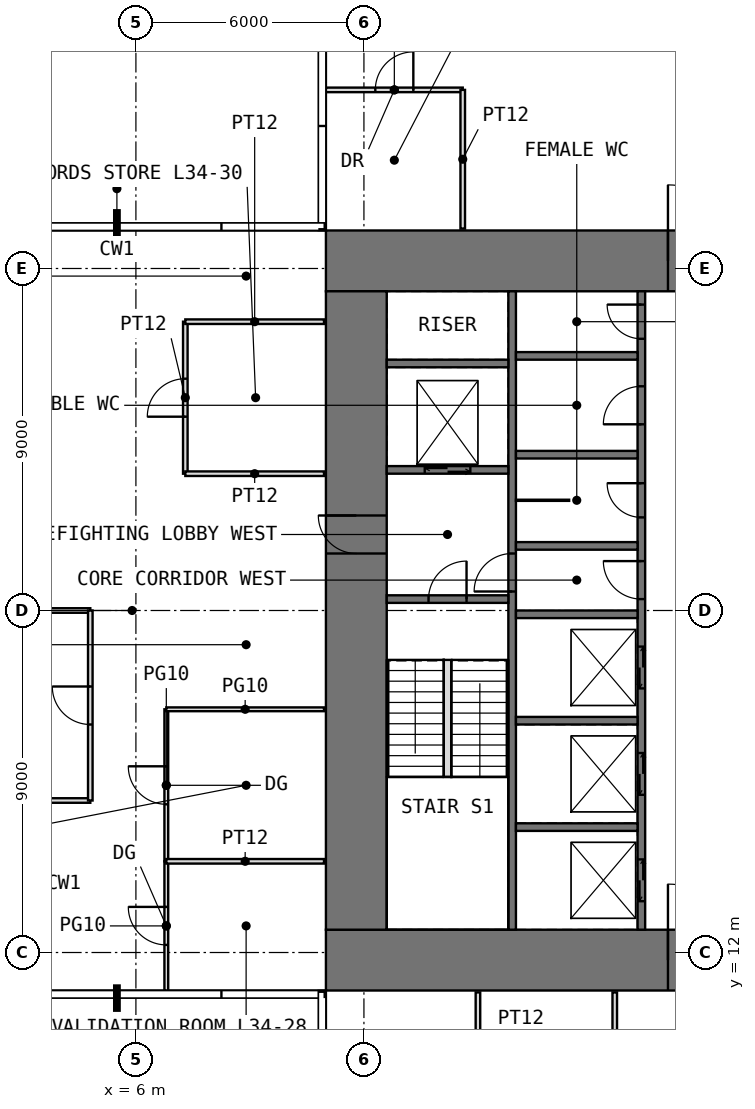
"""IFC4 building model, lengths in metres.
Left out: names, types, materials, properties, quantities, classifications, styles, units other than length and angle.
Written with IfcOpenShell. Run it as: python <this file> out.ifc"""

import sys

from ifc_helpers import new_model, si_unit, direction, frame, frame_2d, origin, place, context, subcontext, project, spatial, rectangle, extrude, element, fill, save


model = new_model("IFC4")
c1 = context("Model", 3, precision=1e-05, world=origin(), true_north=direction((0.0, 1.0)))
c2 = subcontext(c1, "Body", "Model", "MODEL_VIEW")
j1 = project(units=[si_unit("LENGTHUNIT", "METRE"), si_unit("PLANEANGLEUNIT", "RADIAN")], contexts=[c1])
p1 = place(None, origin())
s1 = spatial("IfcSite", under=j1, at=p1, CompositionType="ELEMENT")
p2 = place(p1, origin())
s2 = spatial("IfcBuilding", under=s1, at=p2, CompositionType="ELEMENT")
p3 = place(p2, frame((0.0, 0.0, 144.5)))
s3 = spatial("IfcBuildingStorey", under=s2, at=p3, CompositionType="ELEMENT", Elevation=144.5)
p4 = place(p3, frame((11.0, 11.8, -0.05), z_axis=(0.0, 0.0, 1.0), x_axis=(1.0, 0.0, 0.0)))
e1 = element("IfcWall", 1, at=p4, inside=s3, PredefinedType="SHEAR", context=c2, shape_type="SweptSolid", body=[
    extrude(rectangle(XDim=20.0, YDim=1.6, at=frame_2d((10.0, 0.0))), origin(), (0.0, 0.0, 1.0), 4.0),
])
p5 = place(p4, frame((9.0, 0.0, 0.05)))
e2 = element("IfcOpeningElement", 2, at=p5, cuts=e1, PredefinedType="OPENING", context=c2, shape_type="SweptSolid", body=[
    extrude(rectangle(XDim=2.0, YDim=2.2, at=frame_2d((1.0, 1.1))), frame((0.0, 0.81, 0.0), z_axis=(0.0, -1.0, 0.0), x_axis=(1.0, 0.0, 0.0)), (0.0, 0.0, 1.0), 1.62),
])
p6 = place(p3, frame((11.0, 30.2, -0.05), z_axis=(0.0, 0.0, 1.0), x_axis=(1.0, 0.0, 0.0)))
e3 = element("IfcWall", 3, at=p6, inside=s3, PredefinedType="SHEAR", context=c2, shape_type="SweptSolid", body=[
    extrude(rectangle(XDim=20.0, YDim=1.6, at=frame_2d((10.0, 0.0))), origin(), (0.0, 0.0, 1.0), 4.0),
])
p7 = place(p6, frame((9.0, 0.0, 0.05)))
e4 = element("IfcOpeningElement", 4, at=p7, cuts=e3, PredefinedType="OPENING", context=c2, shape_type="SweptSolid", body=[
    extrude(rectangle(XDim=2.0, YDim=2.2, at=frame_2d((1.0, 1.1))), frame((0.0, 0.81, 0.0), z_axis=(0.0, -1.0, 0.0), x_axis=(1.0, 0.0, 0.0)), (0.0, 0.0, 1.0), 1.62),
])
p8 = place(p3, frame((11.8, 12.6, -0.05), z_axis=(0.0, 0.0, 1.0), x_axis=(0.0, 1.0, 0.0)))
e5 = element("IfcWall", 5, at=p8, inside=s3, PredefinedType="SHEAR", context=c2, shape_type="SweptSolid", body=[
    extrude(rectangle(XDim=16.8, YDim=1.6, at=frame_2d((8.4, 0.0))), origin(), (0.0, 0.0, 1.0), 4.0),
])
p9 = place(p8, frame((9.9, 0.0, 0.05)))
e6 = element("IfcOpeningElement", 6, at=p9, cuts=e5, PredefinedType="OPENING", context=c2, shape_type="SweptSolid", body=[
    extrude(rectangle(XDim=1.0, YDim=2.2, at=frame_2d((0.5, 1.1))), frame((0.0, 0.81, 0.0), z_axis=(0.0, -1.0, 0.0), x_axis=(1.0, 0.0, 0.0)), (0.0, 0.0, 1.0), 1.62),
])
p10 = place(p3, frame((15.9, 12.6, -0.05), z_axis=(0.0, 0.0, 1.0), x_axis=(0.0, 1.0, 0.0)))
e7 = element("IfcWall", 7, at=p10, inside=s3, PredefinedType="SHEAR", context=c2, shape_type="SweptSolid", body=[
    extrude(rectangle(XDim=16.8, YDim=0.2, at=frame_2d((8.4, 0.0))), origin(), (0.0, 0.0, 1.0), 4.0),
])
p11 = place(p10, frame((8.9, 0.0, 0.05)))
e8 = element("IfcOpeningElement", 8, at=p11, cuts=e7, PredefinedType="OPENING", context=c2, shape_type="SweptSolid", body=[
    extrude(rectangle(XDim=1.0, YDim=2.2, at=frame_2d((0.5, 1.1))), frame((0.0, 0.11, 0.0), z_axis=(0.0, -1.0, 0.0), x_axis=(1.0, 0.0, 0.0)), (0.0, 0.0, 1.0), 0.22),
])
p12 = place(p3, frame((19.3, 12.6, -0.05), z_axis=(0.0, 0.0, 1.0), x_axis=(0.0, 1.0, 0.0)))
e9 = element("IfcWall", 9, at=p12, inside=s3, PredefinedType="SHEAR", context=c2, shape_type="SweptSolid", body=[
    extrude(rectangle(XDim=16.8, YDim=0.2, at=frame_2d((8.4, 0.0))), origin(), (0.0, 0.0, 1.0), 4.0),
])
p13 = place(p12, frame((8.7, 0.0, 0.05)))
e10 = element("IfcOpeningElement", 10, at=p13, cuts=e9, PredefinedType="OPENING", context=c2, shape_type="SweptSolid", body=[
    extrude(rectangle(XDim=1.0, YDim=2.2, at=frame_2d((0.5, 1.1))), frame((0.0, 0.11, 0.0), z_axis=(0.0, -1.0, 0.0), x_axis=(1.0, 0.0, 0.0)), (0.0, 0.0, 1.0), 0.22),
])
p14 = place(p12, frame((10.85, 0.0, 0.05)))
e11 = element("IfcOpeningElement", 11, at=p14, cuts=e9, PredefinedType="OPENING", context=c2, shape_type="SweptSolid", body=[
    extrude(rectangle(XDim=0.9, YDim=2.2, at=frame_2d((0.45, 1.1))), frame((0.0, 0.11, 0.0), z_axis=(0.0, -1.0, 0.0), x_axis=(1.0, 0.0, 0.0)), (0.0, 0.0, 1.0), 0.22),
])
p15 = place(p12, frame((13.3, 0.0, 0.05)))
e12 = element("IfcOpeningElement", 12, at=p15, cuts=e9, PredefinedType="OPENING", context=c2, shape_type="SweptSolid", body=[
    extrude(rectangle(XDim=1.0, YDim=2.2, at=frame_2d((0.5, 1.1))), frame((0.0, 0.11, 0.0), z_axis=(0.0, -1.0, 0.0), x_axis=(1.0, 0.0, 0.0)), (0.0, 0.0, 1.0), 0.22),
])
p16 = place(p12, frame((15.55, 0.0, 0.05)))
e13 = element("IfcOpeningElement", 13, at=p16, cuts=e9, PredefinedType="OPENING", context=c2, shape_type="SweptSolid", body=[
    extrude(rectangle(XDim=0.9, YDim=2.2, at=frame_2d((0.45, 1.1))), frame((0.0, 0.11, 0.0), z_axis=(0.0, -1.0, 0.0), x_axis=(1.0, 0.0, 0.0)), (0.0, 0.0, 1.0), 0.22),
])
p17 = place(p12, frame((0.75, 0.0, 0.05)))
e14 = element("IfcOpeningElement", 14, at=p17, cuts=e9, PredefinedType="OPENING", context=c2, shape_type="SweptSolid", body=[
    extrude(rectangle(XDim=1.1, YDim=2.2, at=frame_2d((0.55, 1.1))), frame((0.0, 0.11, 0.0), z_axis=(0.0, -1.0, 0.0), x_axis=(1.0, 0.0, 0.0)), (0.0, 0.0, 1.0), 0.22),
])
p18 = place(p12, frame((3.55, 0.0, 0.05)))
e15 = element("IfcOpeningElement", 15, at=p18, cuts=e9, PredefinedType="OPENING", context=c2, shape_type="SweptSolid", body=[
    extrude(rectangle(XDim=1.1, YDim=2.2, at=frame_2d((0.55, 1.1))), frame((0.0, 0.11, 0.0), z_axis=(0.0, -1.0, 0.0), x_axis=(1.0, 0.0, 0.0)), (0.0, 0.0, 1.0), 0.22),
])
p19 = place(p12, frame((6.35, 0.0, 0.05)))
e16 = element("IfcOpeningElement", 16, at=p19, cuts=e9, PredefinedType="OPENING", context=c2, shape_type="SweptSolid", body=[
    extrude(rectangle(XDim=1.1, YDim=2.2, at=frame_2d((0.55, 1.1))), frame((0.0, 0.11, 0.0), z_axis=(0.0, -1.0, 0.0), x_axis=(1.0, 0.0, 0.0)), (0.0, 0.0, 1.0), 0.22),
])
p20 = place(p3, frame((12.6, 21.3, -0.05), z_axis=(0.0, 0.0, 1.0), x_axis=(1.0, 0.0, 0.0)))
e17 = element("IfcWall", 17, at=p20, inside=s3, PredefinedType="SHEAR", context=c2, shape_type="SweptSolid", body=[
    extrude(rectangle(XDim=3.2, YDim=0.2, at=frame_2d((1.6, 0.0))), origin(), (0.0, 0.0, 1.0), 4.0),
])
p21 = place(p20, frame((1.1, 0.0, 0.05)))
e18 = element("IfcOpeningElement", 18, at=p21, cuts=e17, PredefinedType="OPENING", context=c2, shape_type="SweptSolid", body=[
    extrude(rectangle(XDim=1.0, YDim=2.2, at=frame_2d((0.5, 1.1))), frame((0.0, 0.11, 0.0), z_axis=(0.0, -1.0, 0.0), x_axis=(1.0, 0.0, 0.0)), (0.0, 0.0, 1.0), 0.22),
])
p22 = place(p3, frame((12.6, 24.7, -0.05), z_axis=(0.0, 0.0, 1.0), x_axis=(1.0, 0.0, 0.0)))
e19 = element("IfcWall", 19, at=p22, inside=s3, PredefinedType="SHEAR", context=c2, shape_type="SweptSolid", body=[
    extrude(rectangle(XDim=3.2, YDim=0.2, at=frame_2d((1.6, 0.0))), origin(), (0.0, 0.0, 1.0), 4.0),
])
p23 = place(p22, frame((1.0, 0.0, 0.05)))
e20 = element("IfcOpeningElement", 20, at=p23, cuts=e19, PredefinedType="OPENING", context=c2, shape_type="SweptSolid", body=[
    extrude(rectangle(XDim=1.2, YDim=2.2, at=frame_2d((0.6, 1.1))), frame((0.0, 0.11, 0.0), z_axis=(0.0, -1.0, 0.0), x_axis=(1.0, 0.0, 0.0)), (0.0, 0.0, 1.0), 0.22),
])
for number, where, z_axis, x_axis in (
    (21, (12.6, 27.5, -0.05), (0.0, 0.0, 1.0), (1.0, 0.0, 0.0)),
    (22, (16.0, 15.3, -0.05), (0.0, 0.0, 1.0), (1.0, 0.0, 0.0)),
    (23, (16.0, 18.1, -0.05), (0.0, 0.0, 1.0), (1.0, 0.0, 0.0)),
    (24, (16.0, 20.9, -0.05), (0.0, 0.0, 1.0), (1.0, 0.0, 0.0)),
    (25, (16.0, 22.7, -0.05), (0.0, 0.0, 1.0), (1.0, 0.0, 0.0)),
    (26, (16.0, 25.1, -0.05), (0.0, 0.0, 1.0), (1.0, 0.0, 0.0)),
    (27, (16.0, 27.7, -0.05), (0.0, 0.0, 1.0), (1.0, 0.0, 0.0)),
):
    element("IfcWall", number, at=place(p3, frame(where, z_axis=z_axis, x_axis=x_axis)), inside=s3, PredefinedType="SHEAR", context=c2, shape_type="SweptSolid", body=[
        extrude(rectangle(XDim=3.2, YDim=0.2, at=frame_2d((1.6, 0.0))), origin(), (0.0, 0.0, 1.0), 4.0),
    ])
p24 = place(p3, frame((16.0, 23.9, 0.0), z_axis=(0.0, 0.0, 1.0), x_axis=(1.0, 0.0, 0.0)))
e28 = element("IfcWall", 28, at=p24, inside=s3, PredefinedType="PARTITIONING", context=c2, shape_type="SweptSolid", body=[
    extrude(rectangle(XDim=1.4, YDim=0.03, at=frame_2d((0.7, 0.0))), origin(), (0.0, 0.0, 1.0), 3.75),
])
p25 = place(p3, frame((1.26, 16.0, 0.0), z_axis=(0.0, 0.0, 1.0), x_axis=(1.0, 0.0, 0.0)))
e29 = element("IfcWall", 29, at=p25, inside=s3, PredefinedType="PARTITIONING", context=c2, shape_type="SweptSolid", body=[
    extrude(rectangle(XDim=3.54, YDim=0.12, at=frame_2d((1.77, 0.0))), origin(), (0.0, 0.0, 1.0), 3.75),
])
p26 = place(p3, frame((3.26, 21.0, 0.0), z_axis=(0.0, 0.0, 1.0), x_axis=(1.0, 0.0, 0.0)))
e30 = element("IfcWall", 30, at=p26, inside=s3, PredefinedType="PARTITIONING", context=c2, shape_type="SweptSolid", body=[
    extrude(rectangle(XDim=1.54, YDim=0.12, at=frame_2d((0.77, 0.0))), origin(), (0.0, 0.0, 1.0), 3.75),
])
p27 = place(p3, frame((4.8, 16.0, 0.0), z_axis=(0.0, 0.0, 1.0), x_axis=(0.0, 1.0, 0.0)))
e31 = element("IfcWall", 31, at=p27, inside=s3, PredefinedType="PARTITIONING", context=c2, shape_type="SweptSolid", body=[
    extrude(rectangle(XDim=5.0, YDim=0.12, at=frame_2d((2.5, 0.0))), origin(), (0.0, 0.0, 1.0), 3.75),
])
p28 = place(p27, frame((2.0, 0.0, 0.0)))
e32 = element("IfcOpeningElement", 32, at=p28, cuts=e31, PredefinedType="OPENING", context=c2, shape_type="SweptSolid", body=[
    extrude(rectangle(XDim=1.0, YDim=2.2, at=frame_2d((0.5, 1.1))), frame((0.0, 0.07, 0.0), z_axis=(0.0, -1.0, 0.0), x_axis=(1.0, 0.0, 0.0)), (0.0, 0.0, 1.0), 0.14),
])
p29 = place(p3, frame((6.8, 11.0, 0.0), z_axis=(0.0, 0.0, 1.0), x_axis=(0.0, 1.0, 0.0)))
e33 = element("IfcWall", 33, at=p29, inside=s3, PredefinedType="PARTITIONING", context=c2, shape_type="SweptSolid", body=[
    extrude(rectangle(XDim=3.4, YDim=0.1, at=frame_2d((1.7, 0.0))), origin(), (0.0, 0.0, 1.0), 3.75),
])
p30 = place(p29, frame((1.2, 0.0, 0.0)))
e34 = element("IfcOpeningElement", 34, at=p30, cuts=e33, PredefinedType="OPENING", context=c2, shape_type="SweptSolid", body=[
    extrude(rectangle(XDim=1.0, YDim=2.4, at=frame_2d((0.5, 1.2))), frame((0.0, 0.06, 0.0), z_axis=(0.0, -1.0, 0.0), x_axis=(1.0, 0.0, 0.0)), (0.0, 0.0, 1.0), 0.12),
])
p31 = place(p3, frame((6.8, 14.4, 0.0), z_axis=(0.0, 0.0, 1.0), x_axis=(0.0, 1.0, 0.0)))
e35 = element("IfcWall", 35, at=p31, inside=s3, PredefinedType="PARTITIONING", context=c2, shape_type="SweptSolid", body=[
    extrude(rectangle(XDim=4.0, YDim=0.1, at=frame_2d((2.0, 0.0))), origin(), (0.0, 0.0, 1.0), 3.75),
])
p32 = place(p31, frame((1.5, 0.0, 0.0)))
e36 = element("IfcOpeningElement", 36, at=p32, cuts=e35, PredefinedType="OPENING", context=c2, shape_type="SweptSolid", body=[
    extrude(rectangle(XDim=1.0, YDim=2.4, at=frame_2d((0.5, 1.2))), frame((0.0, 0.06, 0.0), z_axis=(0.0, -1.0, 0.0), x_axis=(1.0, 0.0, 0.0)), (0.0, 0.0, 1.0), 0.12),
])
p33 = place(p3, frame((6.8, 14.4, 0.0), z_axis=(0.0, 0.0, 1.0), x_axis=(1.0, 0.0, 0.0)))
e37 = element("IfcWall", 37, at=p33, inside=s3, PredefinedType="PARTITIONING", context=c2, shape_type="SweptSolid", body=[
    extrude(rectangle(XDim=4.15, YDim=0.12, at=frame_2d((2.075, 0.0))), origin(), (0.0, 0.0, 1.0), 3.75),
])
p34 = place(p3, frame((6.8, 18.4, 0.0), z_axis=(0.0, 0.0, 1.0), x_axis=(1.0, 0.0, 0.0)))
e38 = element("IfcWall", 38, at=p34, inside=s3, PredefinedType="PARTITIONING", context=c2, shape_type="SweptSolid", body=[
    extrude(rectangle(XDim=4.15, YDim=0.1, at=frame_2d((2.075, 0.0))), origin(), (0.0, 0.0, 1.0), 3.75),
])
p35 = place(p3, frame((7.3, 24.6, 0.0), z_axis=(0.0, 0.0, 1.0), x_axis=(0.0, 1.0, 0.0)))
e39 = element("IfcWall", 39, at=p35, inside=s3, PredefinedType="PARTITIONING", context=c2, shape_type="SweptSolid", body=[
    extrude(rectangle(XDim=4.0, YDim=0.12, at=frame_2d((2.0, 0.0))), origin(), (0.0, 0.0, 1.0), 3.75),
])
p36 = place(p35, frame((1.5, 0.0, 0.0)))
e40 = element("IfcOpeningElement", 40, at=p36, cuts=e39, PredefinedType="OPENING", context=c2, shape_type="SweptSolid", body=[
    extrude(rectangle(XDim=1.0, YDim=2.2, at=frame_2d((0.5, 1.1))), frame((0.0, 0.07, 0.0), z_axis=(0.0, -1.0, 0.0), x_axis=(1.0, 0.0, 0.0)), (0.0, 0.0, 1.0), 0.14),
])
for number, where, z_axis, x_axis in (
    (41, (7.3, 24.6, 0.0), (0.0, 0.0, 1.0), (1.0, 0.0, 0.0)),
    (42, (7.3, 28.6, 0.0), (0.0, 0.0, 1.0), (1.0, 0.0, 0.0)),
):
    element("IfcWall", number, at=place(p3, frame(where, z_axis=z_axis, x_axis=x_axis)), inside=s3, PredefinedType="PARTITIONING", context=c2, shape_type="SweptSolid", body=[
        extrude(rectangle(XDim=3.65, YDim=0.12, at=frame_2d((1.825, 0.0))), origin(), (0.0, 0.0, 1.0), 3.75),
    ])
p37 = place(p3, frame((11.0, 34.7, 0.0), z_axis=(0.0, 0.0, 1.0), x_axis=(1.0, 0.0, 0.0)))
e43 = element("IfcWall", 43, at=p37, inside=s3, PredefinedType="PARTITIONING", context=c2, shape_type="SweptSolid", body=[
    extrude(rectangle(XDim=3.6, YDim=0.12, at=frame_2d((1.8, 0.0))), origin(), (0.0, 0.0, 1.0), 3.75),
])
p38 = place(p37, frame((1.3, 0.0, 0.0)))
e44 = element("IfcOpeningElement", 44, at=p38, cuts=e43, PredefinedType="OPENING", context=c2, shape_type="SweptSolid", body=[
    extrude(rectangle(XDim=1.0, YDim=2.2, at=frame_2d((0.5, 1.1))), frame((0.0, 0.07, 0.0), z_axis=(0.0, -1.0, 0.0), x_axis=(1.0, 0.0, 0.0)), (0.0, 0.0, 1.0), 0.14),
])
for number, where, z_axis, x_axis in (
    (45, (14.6, 31.05, 0.0), (0.0, 0.0, 1.0), (0.0, 1.0, 0.0)),
    (46, (15.0, 7.3, 0.0), (0.0, 0.0, 1.0), (0.0, 1.0, 0.0)),
    (47, (18.6, 7.3, 0.0), (0.0, 0.0, 1.0), (0.0, 1.0, 0.0)),
):
    element("IfcWall", number, at=place(p3, frame(where, z_axis=z_axis, x_axis=x_axis)), inside=s3, PredefinedType="PARTITIONING", context=c2, shape_type="SweptSolid", body=[
        extrude(rectangle(XDim=3.65, YDim=0.12, at=frame_2d((1.825, 0.0))), origin(), (0.0, 0.0, 1.0), 3.75),
    ])
p39 = place(p3, frame((14.2, 16.62, 0.0), z_axis=(0.0, 0.0, 1.0), x_axis=(0.0, 1.0, 0.0)))
e48 = element("IfcWall", 48, at=p39, inside=s3, PredefinedType="PARTITIONING", context=c2, shape_type="SweptSolid", body=[
    extrude(rectangle(XDim=3.08, YDim=0.2, at=frame_2d((1.54, 0.0))), origin(), (0.0, 0.0, 1.0), 4.0),
])
p40 = place(p5, origin())
e49 = element("IfcDoor", 49, at=p40, inside=s3, OperationType="DOUBLE_DOOR_SINGLE_SWING", PredefinedType="DOOR", context=c2, shape_type="SweptSolid", body=[
    extrude(rectangle(XDim=2.0, YDim=2.2, at=frame_2d((1.0, 1.1))), frame((0.0, 0.025, 0.0), z_axis=(0.0, -1.0, 0.0), x_axis=(1.0, 0.0, 0.0)), (0.0, 0.0, 1.0), 0.05),
])
fill(e2, e49)
p41 = place(p7, origin())
e50 = element("IfcDoor", 50, at=p41, inside=s3, OperationType="DOUBLE_DOOR_SINGLE_SWING", PredefinedType="DOOR", context=c2, shape_type="SweptSolid", body=[
    extrude(rectangle(XDim=2.0, YDim=2.2, at=frame_2d((1.0, 1.1))), frame((0.0, 0.025, 0.0), z_axis=(0.0, -1.0, 0.0), x_axis=(1.0, 0.0, 0.0)), (0.0, 0.0, 1.0), 0.05),
])
fill(e4, e50)
p42 = place(p9, origin())
e51 = element("IfcDoor", 51, at=p42, inside=s3, OperationType="SINGLE_SWING_RIGHT", PredefinedType="DOOR", context=c2, shape_type="SweptSolid", body=[
    extrude(rectangle(XDim=1.0, YDim=2.2, at=frame_2d((0.5, 1.1))), frame((0.0, 0.025, 0.0), z_axis=(0.0, -1.0, 0.0), x_axis=(1.0, 0.0, 0.0)), (0.0, 0.0, 1.0), 0.05),
])
fill(e6, e51)
p43 = place(p21, origin())
e52 = element("IfcDoor", 52, at=p43, inside=s3, OperationType="SINGLE_SWING_RIGHT", PredefinedType="DOOR", context=c2, shape_type="SweptSolid", body=[
    extrude(rectangle(XDim=1.0, YDim=2.2, at=frame_2d((0.5, 1.1))), frame((0.0, 0.025, 0.0), z_axis=(0.0, -1.0, 0.0), x_axis=(1.0, 0.0, 0.0)), (0.0, 0.0, 1.0), 0.05),
])
fill(e18, e52)
p44 = place(p11, origin())
e53 = element("IfcDoor", 53, at=p44, inside=s3, OperationType="SINGLE_SWING_LEFT", PredefinedType="DOOR", context=c2, shape_type="SweptSolid", body=[
    extrude(rectangle(XDim=1.0, YDim=2.2, at=frame_2d((0.5, 1.1))), frame((0.0, 0.025, 0.0), z_axis=(0.0, -1.0, 0.0), x_axis=(1.0, 0.0, 0.0)), (0.0, 0.0, 1.0), 0.05),
])
fill(e8, e53)
p45 = place(p13, origin())
e54 = element("IfcDoor", 54, at=p45, inside=s3, OperationType="SINGLE_SWING_RIGHT", PredefinedType="DOOR", context=c2, shape_type="SweptSolid", body=[
    extrude(rectangle(XDim=1.0, YDim=2.2, at=frame_2d((0.5, 1.1))), frame((0.0, 0.025, 0.0), z_axis=(0.0, -1.0, 0.0), x_axis=(1.0, 0.0, 0.0)), (0.0, 0.0, 1.0), 0.05),
])
fill(e10, e54)
p46 = place(p14, origin())
e55 = element("IfcDoor", 55, at=p46, inside=s3, OperationType="SINGLE_SWING_RIGHT", PredefinedType="DOOR", context=c2, shape_type="SweptSolid", body=[
    extrude(rectangle(XDim=0.9, YDim=2.2, at=frame_2d((0.45, 1.1))), frame((0.0, 0.025, 0.0), z_axis=(0.0, -1.0, 0.0), x_axis=(1.0, 0.0, 0.0)), (0.0, 0.0, 1.0), 0.05),
])
fill(e11, e55)
p47 = place(p15, origin())
e56 = element("IfcDoor", 56, at=p47, inside=s3, OperationType="SINGLE_SWING_LEFT", PredefinedType="DOOR", context=c2, shape_type="SweptSolid", body=[
    extrude(rectangle(XDim=1.0, YDim=2.2, at=frame_2d((0.5, 1.1))), frame((0.0, 0.025, 0.0), z_axis=(0.0, -1.0, 0.0), x_axis=(1.0, 0.0, 0.0)), (0.0, 0.0, 1.0), 0.05),
])
fill(e12, e56)
p48 = place(p16, origin())
e57 = element("IfcDoor", 57, at=p48, inside=s3, OperationType="SINGLE_SWING_RIGHT", PredefinedType="DOOR", context=c2, shape_type="SweptSolid", body=[
    extrude(rectangle(XDim=0.9, YDim=2.2, at=frame_2d((0.45, 1.1))), frame((0.0, 0.025, 0.0), z_axis=(0.0, -1.0, 0.0), x_axis=(1.0, 0.0, 0.0)), (0.0, 0.0, 1.0), 0.05),
])
fill(e13, e57)
p49 = place(p38, origin())
e58 = element("IfcDoor", 58, at=p49, inside=s3, OperationType="SINGLE_SWING_RIGHT", PredefinedType="DOOR", context=c2, shape_type="SweptSolid", body=[
    extrude(rectangle(XDim=1.0, YDim=2.2, at=frame_2d((0.5, 1.1))), frame((0.0, 0.025, 0.0), z_axis=(0.0, -1.0, 0.0), x_axis=(1.0, 0.0, 0.0)), (0.0, 0.0, 1.0), 0.05),
])
fill(e44, e58)
p50 = place(p30, origin())
e59 = element("IfcDoor", 59, at=p50, inside=s3, OperationType="SINGLE_SWING_RIGHT", PredefinedType="DOOR", context=c2, shape_type="SweptSolid", body=[
    extrude(rectangle(XDim=1.0, YDim=2.4, at=frame_2d((0.5, 1.2))), frame((0.0, 0.025, 0.0), z_axis=(0.0, -1.0, 0.0), x_axis=(1.0, 0.0, 0.0)), (0.0, 0.0, 1.0), 0.05),
])
fill(e34, e59)
p51 = place(p32, origin())
e60 = element("IfcDoor", 60, at=p51, inside=s3, OperationType="SINGLE_SWING_RIGHT", PredefinedType="DOOR", context=c2, shape_type="SweptSolid", body=[
    extrude(rectangle(XDim=1.0, YDim=2.4, at=frame_2d((0.5, 1.2))), frame((0.0, 0.025, 0.0), z_axis=(0.0, -1.0, 0.0), x_axis=(1.0, 0.0, 0.0)), (0.0, 0.0, 1.0), 0.05),
])
fill(e36, e60)
p52 = place(p36, origin())
e61 = element("IfcDoor", 61, at=p52, inside=s3, OperationType="SINGLE_SWING_LEFT", PredefinedType="DOOR", context=c2, shape_type="SweptSolid", body=[
    extrude(rectangle(XDim=1.0, YDim=2.2, at=frame_2d((0.5, 1.1))), frame((0.0, 0.025, 0.0), z_axis=(0.0, -1.0, 0.0), x_axis=(1.0, 0.0, 0.0)), (0.0, 0.0, 1.0), 0.05),
])
fill(e40, e61)
p53 = place(p28, origin())
e62 = element("IfcDoor", 62, at=p53, inside=s3, OperationType="SINGLE_SWING_RIGHT", PredefinedType="DOOR", context=c2, shape_type="SweptSolid", body=[
    extrude(rectangle(XDim=1.0, YDim=2.2, at=frame_2d((0.5, 1.1))), frame((0.0, 0.025, 0.0), z_axis=(0.0, -1.0, 0.0), x_axis=(1.0, 0.0, 0.0)), (0.0, 0.0, 1.0), 0.05),
])
fill(e32, e62)
p54 = place(p17, origin())
e63 = element("IfcDoor", 63, at=p54, inside=s3, OperationType="DOUBLE_DOOR_SLIDING", PredefinedType="DOOR", context=c2, shape_type="SweptSolid", body=[
    extrude(rectangle(XDim=1.1, YDim=2.2, at=frame_2d((0.55, 1.1))), frame((0.0, 0.025, 0.0), z_axis=(0.0, -1.0, 0.0), x_axis=(1.0, 0.0, 0.0)), (0.0, 0.0, 1.0), 0.05),
])
fill(e14, e63)
p55 = place(p18, origin())
e64 = element("IfcDoor", 64, at=p55, inside=s3, OperationType="DOUBLE_DOOR_SLIDING", PredefinedType="DOOR", context=c2, shape_type="SweptSolid", body=[
    extrude(rectangle(XDim=1.1, YDim=2.2, at=frame_2d((0.55, 1.1))), frame((0.0, 0.025, 0.0), z_axis=(0.0, -1.0, 0.0), x_axis=(1.0, 0.0, 0.0)), (0.0, 0.0, 1.0), 0.05),
])
fill(e15, e64)
p56 = place(p19, origin())
e65 = element("IfcDoor", 65, at=p56, inside=s3, OperationType="DOUBLE_DOOR_SLIDING", PredefinedType="DOOR", context=c2, shape_type="SweptSolid", body=[
    extrude(rectangle(XDim=1.1, YDim=2.2, at=frame_2d((0.55, 1.1))), frame((0.0, 0.025, 0.0), z_axis=(0.0, -1.0, 0.0), x_axis=(1.0, 0.0, 0.0)), (0.0, 0.0, 1.0), 0.05),
])
fill(e16, e65)
p57 = place(p23, origin())
e66 = element("IfcDoor", 66, at=p57, inside=s3, OperationType="DOUBLE_DOOR_SLIDING", PredefinedType="DOOR", context=c2, shape_type="SweptSolid", body=[
    extrude(rectangle(XDim=1.2, YDim=2.2, at=frame_2d((0.6, 1.1))), frame((0.0, 0.025, 0.0), z_axis=(0.0, -1.0, 0.0), x_axis=(1.0, 0.0, 0.0)), (0.0, 0.0, 1.0), 0.05),
])
fill(e20, e66)
save(model, sys.argv[1])
